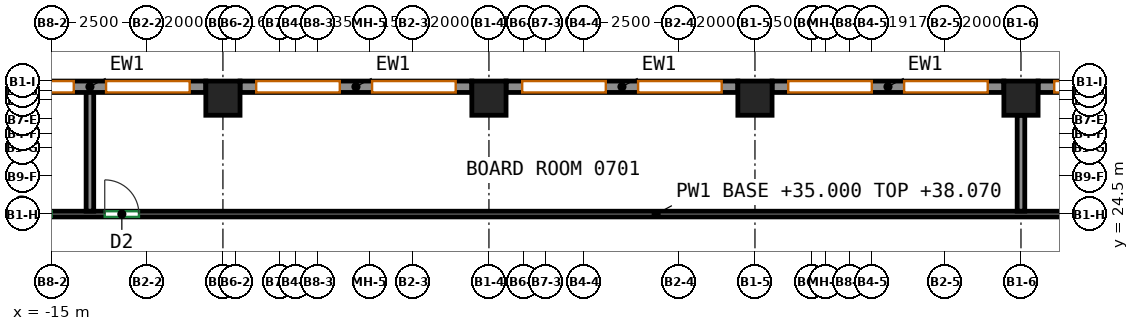
"""IFC4 building model, lengths in metres.
Left out: names, types, materials, properties, quantities, classifications, styles, units other than length and angle.
Written with IfcOpenShell. Run it as: python <this file> out.ifc"""

import sys

from ifc_helpers import new_model, si_unit, direction, frame, frame_2d, origin, origin_2d, place, context, subcontext, project, spatial, rectangle, extrude, source, transform, mapped, element, fill, save


model = new_model("IFC4")
c1 = context("Model", 3, precision=1e-05, world=origin(), true_north=direction((0.0, 1.0)))
c2 = subcontext(c1, "Body", "Model", "MODEL_VIEW")
j1 = project(units=[si_unit("LENGTHUNIT", "METRE"), si_unit("PLANEANGLEUNIT", "RADIAN")], contexts=[c1])
p1 = place(None, origin())
s1 = spatial("IfcSite", under=j1, at=p1, CompositionType="ELEMENT")
p2 = place(p1, origin())
s2 = spatial("IfcBuilding", under=s1, at=p2, CompositionType="ELEMENT")
p3 = place(p2, frame((0.0, 0.0, 35.0)))
s3 = spatial("IfcBuildingStorey", under=s2, at=p3, CompositionType="ELEMENT", Elevation=35.0)
m1 = source(origin(), c2, "Body", "SweptSolid", [
    extrude(rectangle(XDim=0.9, YDim=0.9, at=origin_2d()), origin(), (0.0, 0.0, 1.0), 3.72),
])
for number, where, z_axis, x_axis in (
    (1, (-10.5, 27.55, 0.0), (0.0, 0.0, 1.0), (1.0, 0.0, 0.0)),
    (2, (-3.5, 27.55, 0.0), (0.0, 0.0, 1.0), (1.0, 0.0, 0.0)),
    (3, (3.5, 27.55, 0.0), (0.0, 0.0, 1.0), (1.0, 0.0, 0.0)),
    (4, (10.5, 27.55, 0.0), (0.0, 0.0, 1.0), (1.0, 0.0, 0.0)),
):
    element("IfcColumn", number, at=place(p3, frame(where, z_axis=z_axis, x_axis=x_axis)), inside=s3, PredefinedType="COLUMN", context=c2, shape_type="MappedRepresentation", body=[
        mapped(m1, transform((0.0, 0.0, 0.0))),
    ])
m2 = source(origin(), c2, "Body", "SweptSolid", [
    extrude(rectangle(XDim=6.1, YDim=0.3, at=frame_2d((3.05, 0.0))), origin(), (0.0, 0.0, 1.0), 3.72),
])
p4 = place(p3, frame((17.05, 27.85, 0.0), z_axis=(0.0, 0.0, 1.0), x_axis=(-1.0, 0.0, 0.0)))
e5 = element("IfcWall", 5, at=p4, inside=s3, PredefinedType="SOLIDWALL", context=c2, shape_type="MappedRepresentation", body=[
    mapped(m2, transform((0.0, 0.0, 0.0))),
])
p5 = place(p4, frame((0.425, 0.0, 0.7)))
e6 = element("IfcOpeningElement", 6, at=p5, cuts=e5, PredefinedType="OPENING", context=c2, shape_type="SweptSolid", body=[
    extrude(rectangle(XDim=2.2, YDim=2.25, at=frame_2d((1.1, 1.125))), frame((0.0, 0.16, 0.0), z_axis=(0.0, -1.0, 0.0), x_axis=(1.0, 0.0, 0.0)), (0.0, 0.0, 1.0), 0.32),
])
p6 = place(p4, frame((3.475, 0.0, 0.7)))
e7 = element("IfcOpeningElement", 7, at=p6, cuts=e5, PredefinedType="OPENING", context=c2, shape_type="SweptSolid", body=[
    extrude(rectangle(XDim=2.2, YDim=2.25, at=frame_2d((1.1, 1.125))), frame((0.0, 0.16, 0.0), z_axis=(0.0, -1.0, 0.0), x_axis=(1.0, 0.0, 0.0)), (0.0, 0.0, 1.0), 0.32),
])
p7 = place(p3, frame((10.05, 27.85, 0.0), z_axis=(0.0, 0.0, 1.0), x_axis=(-1.0, 0.0, 0.0)))
e8 = element("IfcWall", 8, at=p7, inside=s3, PredefinedType="SOLIDWALL", context=c2, shape_type="MappedRepresentation", body=[
    mapped(m2, transform((0.0, 0.0, 0.0))),
])
p8 = place(p7, frame((0.425, 0.0, 0.7)))
e9 = element("IfcOpeningElement", 9, at=p8, cuts=e8, PredefinedType="OPENING", context=c2, shape_type="SweptSolid", body=[
    extrude(rectangle(XDim=2.2, YDim=2.25, at=frame_2d((1.1, 1.125))), frame((0.0, 0.16, 0.0), z_axis=(0.0, -1.0, 0.0), x_axis=(1.0, 0.0, 0.0)), (0.0, 0.0, 1.0), 0.32),
])
p9 = place(p7, frame((3.475, 0.0, 0.7)))
e10 = element("IfcOpeningElement", 10, at=p9, cuts=e8, PredefinedType="OPENING", context=c2, shape_type="SweptSolid", body=[
    extrude(rectangle(XDim=2.2, YDim=2.25, at=frame_2d((1.1, 1.125))), frame((0.0, 0.16, 0.0), z_axis=(0.0, -1.0, 0.0), x_axis=(1.0, 0.0, 0.0)), (0.0, 0.0, 1.0), 0.32),
])
p10 = place(p3, frame((3.05, 27.85, 0.0), z_axis=(0.0, 0.0, 1.0), x_axis=(-1.0, 0.0, 0.0)))
e11 = element("IfcWall", 11, at=p10, inside=s3, PredefinedType="SOLIDWALL", context=c2, shape_type="MappedRepresentation", body=[
    mapped(m2, transform((0.0, 0.0, 0.0))),
])
p11 = place(p10, frame((0.425, 0.0, 0.7)))
e12 = element("IfcOpeningElement", 12, at=p11, cuts=e11, PredefinedType="OPENING", context=c2, shape_type="SweptSolid", body=[
    extrude(rectangle(XDim=2.2, YDim=2.25, at=frame_2d((1.1, 1.125))), frame((0.0, 0.16, 0.0), z_axis=(0.0, -1.0, 0.0), x_axis=(1.0, 0.0, 0.0)), (0.0, 0.0, 1.0), 0.32),
])
p12 = place(p10, frame((3.475, 0.0, 0.7)))
e13 = element("IfcOpeningElement", 13, at=p12, cuts=e11, PredefinedType="OPENING", context=c2, shape_type="SweptSolid", body=[
    extrude(rectangle(XDim=2.2, YDim=2.25, at=frame_2d((1.1, 1.125))), frame((0.0, 0.16, 0.0), z_axis=(0.0, -1.0, 0.0), x_axis=(1.0, 0.0, 0.0)), (0.0, 0.0, 1.0), 0.32),
])
p13 = place(p3, frame((-3.95, 27.85, 0.0), z_axis=(0.0, 0.0, 1.0), x_axis=(-1.0, 0.0, 0.0)))
e14 = element("IfcWall", 14, at=p13, inside=s3, PredefinedType="SOLIDWALL", context=c2, shape_type="MappedRepresentation", body=[
    mapped(m2, transform((0.0, 0.0, 0.0))),
])
p14 = place(p13, frame((0.425, 0.0, 0.7)))
e15 = element("IfcOpeningElement", 15, at=p14, cuts=e14, PredefinedType="OPENING", context=c2, shape_type="SweptSolid", body=[
    extrude(rectangle(XDim=2.2, YDim=2.25, at=frame_2d((1.1, 1.125))), frame((0.0, 0.16, 0.0), z_axis=(0.0, -1.0, 0.0), x_axis=(1.0, 0.0, 0.0)), (0.0, 0.0, 1.0), 0.32),
])
p15 = place(p13, frame((3.475, 0.0, 0.7)))
e16 = element("IfcOpeningElement", 16, at=p15, cuts=e14, PredefinedType="OPENING", context=c2, shape_type="SweptSolid", body=[
    extrude(rectangle(XDim=2.2, YDim=2.25, at=frame_2d((1.1, 1.125))), frame((0.0, 0.16, 0.0), z_axis=(0.0, -1.0, 0.0), x_axis=(1.0, 0.0, 0.0)), (0.0, 0.0, 1.0), 0.32),
])
p16 = place(p3, frame((-10.95, 27.85, 0.0), z_axis=(0.0, 0.0, 1.0), x_axis=(-1.0, 0.0, 0.0)))
e17 = element("IfcWall", 17, at=p16, inside=s3, PredefinedType="SOLIDWALL", context=c2, shape_type="MappedRepresentation", body=[
    mapped(m2, transform((0.0, 0.0, 0.0))),
])
p17 = place(p16, frame((0.425, 0.0, 0.7)))
e18 = element("IfcOpeningElement", 18, at=p17, cuts=e17, PredefinedType="OPENING", context=c2, shape_type="SweptSolid", body=[
    extrude(rectangle(XDim=2.2, YDim=2.25, at=frame_2d((1.1, 1.125))), frame((0.0, 0.16, 0.0), z_axis=(0.0, -1.0, 0.0), x_axis=(1.0, 0.0, 0.0)), (0.0, 0.0, 1.0), 0.32),
])
p18 = place(p16, frame((3.475, 0.0, 0.7)))
e19 = element("IfcOpeningElement", 19, at=p18, cuts=e17, PredefinedType="OPENING", context=c2, shape_type="SweptSolid", body=[
    extrude(rectangle(XDim=2.2, YDim=2.25, at=frame_2d((1.1, 1.125))), frame((0.0, 0.16, 0.0), z_axis=(0.0, -1.0, 0.0), x_axis=(1.0, 0.0, 0.0)), (0.0, 0.0, 1.0), 0.32),
])
p19 = place(p3, frame((-19.275, 24.5, 0.0), z_axis=(0.0, 0.0, 1.0), x_axis=(1.0, 0.0, 0.0)))
e20 = element("IfcWall", 20, at=p19, inside=s3, PredefinedType="PARTITIONING", context=c2, shape_type="SweptSolid", body=[
    extrude(rectangle(XDim=40.35, YDim=0.15, at=frame_2d((20.175, 0.0))), origin(), (0.0, 0.0, 1.0), 3.07),
])
p20 = place(p19, frame((3.368, 0.0, 0.0)))
e21 = element("IfcOpeningElement", 21, at=p20, cuts=e20, PredefinedType="OPENING", context=c2, shape_type="SweptSolid", body=[
    extrude(rectangle(XDim=0.9, YDim=2.1, at=frame_2d((0.45, 1.05))), frame((0.0, 0.085, 0.0), z_axis=(0.0, -1.0, 0.0), x_axis=(1.0, 0.0, 0.0)), (0.0, 0.0, 1.0), 0.17),
])
p21 = place(p19, frame((5.665, 0.0, 0.0)))
e22 = element("IfcOpeningElement", 22, at=p21, cuts=e20, PredefinedType="OPENING", context=c2, shape_type="SweptSolid", body=[
    extrude(rectangle(XDim=0.9, YDim=2.1, at=frame_2d((0.45, 1.05))), frame((0.0, 0.085, 0.0), z_axis=(0.0, -1.0, 0.0), x_axis=(1.0, 0.0, 0.0)), (0.0, 0.0, 1.0), 0.17),
])
p22 = place(p19, frame((38.544, 0.0, 0.0)))
e23 = element("IfcOpeningElement", 23, at=p22, cuts=e20, PredefinedType="OPENING", context=c2, shape_type="SweptSolid", body=[
    extrude(rectangle(XDim=1.0, YDim=2.1, at=frame_2d((0.5, 1.05))), frame((0.0, 0.085, 0.0), z_axis=(0.0, -1.0, 0.0), x_axis=(1.0, 0.0, 0.0)), (0.0, 0.0, 1.0), 0.17),
])
p23 = place(p3, frame((10.5, 24.576, 0.0), z_axis=(0.0, 0.0, 1.0), x_axis=(0.0, 1.0, 0.0)))
e24 = element("IfcWall", 24, at=p23, inside=s3, PredefinedType="PARTITIONING", context=c2, shape_type="SweptSolid", body=[
    extrude(rectangle(XDim=2.524, YDim=0.2, at=frame_2d((1.262, 0.0))), origin(), (0.0, 0.0, 1.0), 3.72),
])
p24 = place(p3, frame((-14.0, 24.576, 0.0), z_axis=(0.0, 0.0, 1.0), x_axis=(0.0, 1.0, 0.0)))
e25 = element("IfcWall", 25, at=p24, inside=s3, PredefinedType="PARTITIONING", context=c2, shape_type="SweptSolid", body=[
    extrude(rectangle(XDim=3.174, YDim=0.2, at=frame_2d((1.587, 0.0))), origin(), (0.0, 0.0, 1.0), 3.72),
])
p25 = place(p6, origin())
e26 = element("IfcWindow", 26, at=p25, inside=s3, PartitioningType="SINGLE_PANEL", PredefinedType="WINDOW", context=c2, shape_type="SweptSolid", body=[
    extrude(rectangle(XDim=2.2, YDim=2.25, at=frame_2d((1.1, 1.125))), frame((0.0, 0.03, 0.0), z_axis=(0.0, -1.0, 0.0), x_axis=(1.0, 0.0, 0.0)), (0.0, 0.0, 1.0), 0.06),
])
fill(e7, e26)
p26 = place(p8, origin())
e27 = element("IfcWindow", 27, at=p26, inside=s3, PartitioningType="SINGLE_PANEL", PredefinedType="WINDOW", context=c2, shape_type="SweptSolid", body=[
    extrude(rectangle(XDim=2.2, YDim=2.25, at=frame_2d((1.1, 1.125))), frame((0.0, 0.03, 0.0), z_axis=(0.0, -1.0, 0.0), x_axis=(1.0, 0.0, 0.0)), (0.0, 0.0, 1.0), 0.06),
])
fill(e9, e27)
p27 = place(p9, origin())
e28 = element("IfcWindow", 28, at=p27, inside=s3, PartitioningType="SINGLE_PANEL", PredefinedType="WINDOW", context=c2, shape_type="SweptSolid", body=[
    extrude(rectangle(XDim=2.2, YDim=2.25, at=frame_2d((1.1, 1.125))), frame((0.0, 0.03, 0.0), z_axis=(0.0, -1.0, 0.0), x_axis=(1.0, 0.0, 0.0)), (0.0, 0.0, 1.0), 0.06),
])
fill(e10, e28)
p28 = place(p11, origin())
e29 = element("IfcWindow", 29, at=p28, inside=s3, PartitioningType="SINGLE_PANEL", PredefinedType="WINDOW", context=c2, shape_type="SweptSolid", body=[
    extrude(rectangle(XDim=2.2, YDim=2.25, at=frame_2d((1.1, 1.125))), frame((0.0, 0.03, 0.0), z_axis=(0.0, -1.0, 0.0), x_axis=(1.0, 0.0, 0.0)), (0.0, 0.0, 1.0), 0.06),
])
fill(e12, e29)
p29 = place(p12, origin())
e30 = element("IfcWindow", 30, at=p29, inside=s3, PartitioningType="SINGLE_PANEL", PredefinedType="WINDOW", context=c2, shape_type="SweptSolid", body=[
    extrude(rectangle(XDim=2.2, YDim=2.25, at=frame_2d((1.1, 1.125))), frame((0.0, 0.03, 0.0), z_axis=(0.0, -1.0, 0.0), x_axis=(1.0, 0.0, 0.0)), (0.0, 0.0, 1.0), 0.06),
])
fill(e13, e30)
p30 = place(p14, origin())
e31 = element("IfcWindow", 31, at=p30, inside=s3, PartitioningType="SINGLE_PANEL", PredefinedType="WINDOW", context=c2, shape_type="SweptSolid", body=[
    extrude(rectangle(XDim=2.2, YDim=2.25, at=frame_2d((1.1, 1.125))), frame((0.0, 0.03, 0.0), z_axis=(0.0, -1.0, 0.0), x_axis=(1.0, 0.0, 0.0)), (0.0, 0.0, 1.0), 0.06),
])
fill(e15, e31)
p31 = place(p15, origin())
e32 = element("IfcWindow", 32, at=p31, inside=s3, PartitioningType="SINGLE_PANEL", PredefinedType="WINDOW", context=c2, shape_type="SweptSolid", body=[
    extrude(rectangle(XDim=2.2, YDim=2.25, at=frame_2d((1.1, 1.125))), frame((0.0, 0.03, 0.0), z_axis=(0.0, -1.0, 0.0), x_axis=(1.0, 0.0, 0.0)), (0.0, 0.0, 1.0), 0.06),
])
fill(e16, e32)
p32 = place(p17, origin())
e33 = element("IfcWindow", 33, at=p32, inside=s3, PartitioningType="SINGLE_PANEL", PredefinedType="WINDOW", context=c2, shape_type="SweptSolid", body=[
    extrude(rectangle(XDim=2.2, YDim=2.25, at=frame_2d((1.1, 1.125))), frame((0.0, 0.03, 0.0), z_axis=(0.0, -1.0, 0.0), x_axis=(1.0, 0.0, 0.0)), (0.0, 0.0, 1.0), 0.06),
])
fill(e18, e33)
p33 = place(p18, origin())
e34 = element("IfcWindow", 34, at=p33, inside=s3, PartitioningType="SINGLE_PANEL", PredefinedType="WINDOW", context=c2, shape_type="SweptSolid", body=[
    extrude(rectangle(XDim=2.2, YDim=2.25, at=frame_2d((1.1, 1.125))), frame((0.0, 0.03, 0.0), z_axis=(0.0, -1.0, 0.0), x_axis=(1.0, 0.0, 0.0)), (0.0, 0.0, 1.0), 0.06),
])
fill(e19, e34)
p34 = place(p21, origin())
e35 = element("IfcDoor", 35, at=p34, inside=s3, OperationType="SINGLE_SWING_LEFT", PredefinedType="DOOR", context=c2, shape_type="SweptSolid", body=[
    extrude(rectangle(XDim=0.9, YDim=2.1, at=frame_2d((0.45, 1.05))), frame((0.0, 0.025, 0.0), z_axis=(0.0, -1.0, 0.0), x_axis=(1.0, 0.0, 0.0)), (0.0, 0.0, 1.0), 0.05),
])
fill(e22, e35)
save(model, sys.argv[1])
